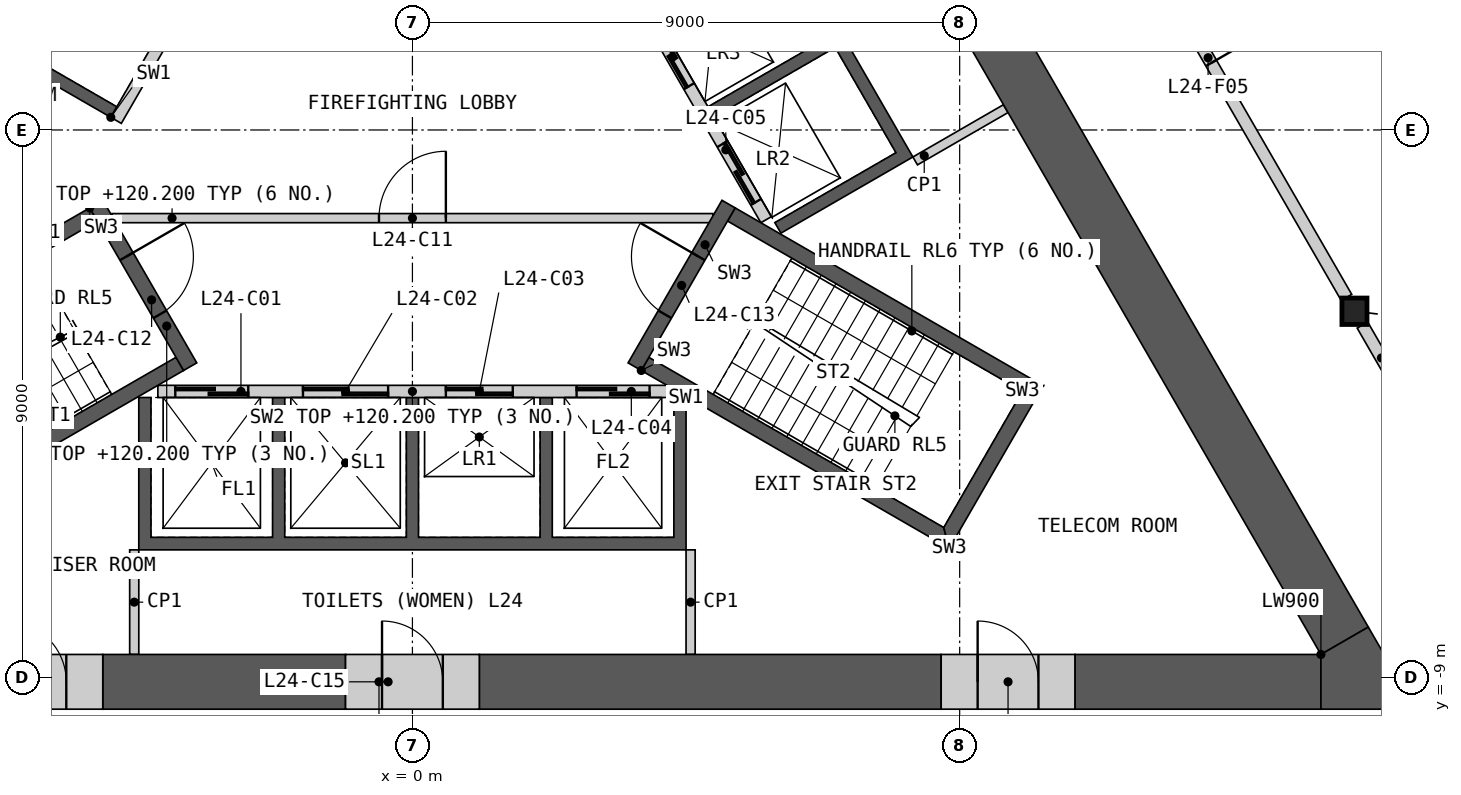
"""IFC4 building model, lengths in metres.
Left out: names, types, materials, properties, quantities, classifications, styles, units other than length and angle.
Written with IfcOpenShell. Run it as: python <this file> out.ifc"""

import sys

from ifc_helpers import new_model, si_unit, direction, frame, frame_2d, origin, origin_2d, place, context, subcontext, project, spatial, polyline, rectangle, i_section, outline, extrude, element, fill, save


model = new_model("IFC4")
c1 = context("Model", 3, precision=1e-05, world=origin(), true_north=direction((0.0, 1.0)))
c2 = subcontext(c1, "Body", "Model", "MODEL_VIEW")
j1 = project(units=[si_unit("LENGTHUNIT", "METRE"), si_unit("PLANEANGLEUNIT", "RADIAN")], contexts=[c1])
p1 = place(None, origin())
s1 = spatial("IfcSite", under=j1, at=p1, CompositionType="ELEMENT")
p2 = place(p1, origin())
s2 = spatial("IfcBuilding", under=s1, at=p2, CompositionType="ELEMENT")
p3 = place(p2, frame((0.0, 0.0, 116.4)))
s3 = spatial("IfcBuildingStorey", under=s2, at=p3, CompositionType="ELEMENT", Elevation=116.4)
p4 = place(p3, frame((15.493, -2.982, 0.0), z_axis=(0.0, 0.0, 1.0), x_axis=(1.0, 0.0, 0.0)))
e1 = element("IfcColumn", 1, at=p4, inside=s3, PredefinedType="COLUMN", context=c2, shape_type="SweptSolid", body=[
    extrude(i_section(OverallWidth=0.412, OverallDepth=0.435, WebThickness=0.036, FlangeThickness=0.057, at=origin_2d()), origin(), (0.0, 0.0, 1.0), 4.2),
])
p5 = place(p3, origin())
e2 = element("IfcWall", 2, at=p5, inside=s3, PredefinedType="SHEAR", context=c2, shape_type="SweptSolid", body=[
    extrude(outline(polyline([(4.5, -4.4), (4.5, -6.906), (-4.5, -6.906), (-4.5, -4.4), (-4.3, -4.4), (-4.3, -6.7), (-2.3, -6.7), (-2.3, -4.4), (-2.1, -4.4), (-2.1, -6.7), (-0.1, -6.7), (-0.1, -4.4), (0.1, -4.4), (0.1, -6.7), (2.1, -6.7), (2.1, -4.4), (2.3, -4.4), (2.3, -6.7), (4.3, -6.7), (4.3, -4.4), (4.5, -4.4)])), origin(), (0.0, 0.0, 1.0), 3.8),
])
p6 = place(p3, frame((-4.187, -4.3, 0.0), z_axis=(0.0, 0.0, 1.0), x_axis=(1.0, 0.0, 0.0)))
e3 = element("IfcWall", 3, at=p6, inside=s3, PredefinedType="SOLIDWALL", context=c2, shape_type="SweptSolid", body=[
    extrude(rectangle(XDim=8.373, YDim=0.2, at=frame_2d((4.187, 0.0))), origin(), (0.0, 0.0, 1.0), 3.8),
])
p7 = place(p6, frame((0.287, 0.0, 0.0)))
e4 = element("IfcOpeningElement", 4, at=p7, cuts=e3, PredefinedType="OPENING", context=c2, shape_type="SweptSolid", body=[
    extrude(rectangle(XDim=1.2, YDim=2.1, at=frame_2d((0.6, 1.05))), frame((0.0, 0.11, 0.0), z_axis=(0.0, -1.0, 0.0), x_axis=(1.0, 0.0, 0.0)), (0.0, 0.0, 1.0), 0.22),
])
p8 = place(p6, frame((2.387, 0.0, 0.0)))
e5 = element("IfcOpeningElement", 5, at=p8, cuts=e3, PredefinedType="OPENING", context=c2, shape_type="SweptSolid", body=[
    extrude(rectangle(XDim=1.4, YDim=2.1, at=frame_2d((0.7, 1.05))), frame((0.0, 0.11, 0.0), z_axis=(0.0, -1.0, 0.0), x_axis=(1.0, 0.0, 0.0)), (0.0, 0.0, 1.0), 0.22),
])
p9 = place(p6, frame((4.737, 0.0, 0.0)))
e6 = element("IfcOpeningElement", 6, at=p9, cuts=e3, PredefinedType="OPENING", context=c2, shape_type="SweptSolid", body=[
    extrude(rectangle(XDim=1.1, YDim=2.1, at=frame_2d((0.55, 1.05))), frame((0.0, 0.11, 0.0), z_axis=(0.0, -1.0, 0.0), x_axis=(1.0, 0.0, 0.0)), (0.0, 0.0, 1.0), 0.22),
])
p10 = place(p6, frame((6.887, 0.0, 0.0)))
e7 = element("IfcOpeningElement", 7, at=p10, cuts=e3, PredefinedType="OPENING", context=c2, shape_type="SweptSolid", body=[
    extrude(rectangle(XDim=1.2, YDim=2.1, at=frame_2d((0.6, 1.05))), frame((0.0, 0.11, 0.0), z_axis=(0.0, -1.0, 0.0), x_axis=(1.0, 0.0, 0.0)), (0.0, 0.0, 1.0), 0.22),
])
p11 = place(p3, origin())
e8 = element("IfcWall", 8, at=p11, inside=s3, PredefinedType="SHEAR", context=c2, shape_type="SweptSolid", body=[
    extrude(outline(polyline([(2.66, 4.192), (4.831, 5.445), (8.231, -0.444), (6.061, -1.697), (5.96, -1.524), (7.952, -0.374), (6.952, 1.358), (4.96, 0.208), (4.861, 0.381), (6.852, 1.531), (5.852, 3.263), (3.861, 2.113), (3.76, 2.287), (5.752, 3.437), (4.752, 5.169), (2.76, 4.019), (2.66, 4.192)])), origin(), (0.0, 0.0, 1.0), 3.8),
])
p12 = place(p3, frame((5.817, -1.476, 0.0), z_axis=(0.0, 0.0, 1.0), x_axis=(-0.500002616675, 0.866023893041, 0.0)))
e9 = element("IfcWall", 9, at=p12, inside=s3, PredefinedType="SOLIDWALL", context=c2, shape_type="SweptSolid", body=[
    extrude(rectangle(XDim=8.373, YDim=0.2, at=frame_2d((4.187, 0.0))), origin(), (0.0, 0.0, 1.0), 3.8),
])
p13 = place(p12, frame((0.337, 0.0, 0.0)))
e10 = element("IfcOpeningElement", 10, at=p13, cuts=e9, PredefinedType="OPENING", context=c2, shape_type="SweptSolid", body=[
    extrude(rectangle(XDim=1.1, YDim=2.1, at=frame_2d((0.55, 1.05))), frame((0.0, 0.11, 0.0), z_axis=(0.0, -1.0, 0.0), x_axis=(1.0, 0.0, 0.0)), (0.0, 0.0, 1.0), 0.22),
])
p14 = place(p12, frame((2.537, 0.0, 0.0)))
e11 = element("IfcOpeningElement", 11, at=p14, cuts=e9, PredefinedType="OPENING", context=c2, shape_type="SweptSolid", body=[
    extrude(rectangle(XDim=1.1, YDim=2.1, at=frame_2d((0.55, 1.05))), frame((0.0, 0.11, 0.0), z_axis=(0.0, -1.0, 0.0), x_axis=(1.0, 0.0, 0.0)), (0.0, 0.0, 1.0), 0.22),
])
p15 = place(p12, frame((4.737, 0.0, 0.0)))
e12 = element("IfcOpeningElement", 12, at=p15, cuts=e9, PredefinedType="OPENING", context=c2, shape_type="SweptSolid", body=[
    extrude(rectangle(XDim=1.1, YDim=2.1, at=frame_2d((0.55, 1.05))), frame((0.0, 0.11, 0.0), z_axis=(0.0, -1.0, 0.0), x_axis=(1.0, 0.0, 0.0)), (0.0, 0.0, 1.0), 0.22),
])
p16 = place(p12, frame((7.037, 0.0, 0.0)))
e13 = element("IfcOpeningElement", 13, at=p16, cuts=e9, PredefinedType="OPENING", context=c2, shape_type="SweptSolid", body=[
    extrude(rectangle(XDim=0.9, YDim=2.1, at=frame_2d((0.45, 1.05))), frame((0.0, 0.11, 0.0), z_axis=(0.0, -1.0, 0.0), x_axis=(1.0, 0.0, 0.0)), (0.0, 0.0, 1.0), 0.22),
])
p17 = place(p3, origin())
e14 = element("IfcWall", 14, at=p17, inside=s3, PredefinedType="SHEAR", context=c2, shape_type="SweptSolid", body=[
    extrude(outline(polyline([(-4.96, 0.208), (-7.131, 1.461), (-5.931, 3.54), (-3.76, 2.287), (-3.861, 2.113), (-5.852, 3.263), (-6.852, 1.531), (-4.861, 0.381), (-4.96, 0.208)])), origin(), (0.0, 0.0, 1.0), 3.8),
])
p18 = place(p3, frame((-1.631, 5.776, 0.0), z_axis=(0.0, 0.0, 1.0), x_axis=(-0.499992876559, -0.866029516466, 0.0)))
e15 = element("IfcWall", 15, at=p18, inside=s3, PredefinedType="SOLIDWALL", context=c2, shape_type="SweptSolid", body=[
    extrude(rectangle(XDim=6.486, YDim=0.2, at=frame_2d((3.243, 0.0))), origin(), (0.0, 0.0, 1.0), 3.8),
])
p19 = place(p18, frame((0.437, 0.0, 0.0)))
e16 = element("IfcOpeningElement", 16, at=p19, cuts=e15, PredefinedType="OPENING", context=c2, shape_type="SweptSolid", body=[
    extrude(rectangle(XDim=0.9, YDim=2.1, at=frame_2d((0.45, 1.05))), frame((0.0, 0.11, 0.0), z_axis=(0.0, -1.0, 0.0), x_axis=(1.0, 0.0, 0.0)), (0.0, 0.0, 1.0), 0.22),
])
p20 = place(p18, frame((2.637, 0.0, 0.0)))
e17 = element("IfcOpeningElement", 17, at=p20, cuts=e15, PredefinedType="OPENING", context=c2, shape_type="SweptSolid", body=[
    extrude(rectangle(XDim=0.9, YDim=2.1, at=frame_2d((0.45, 1.05))), frame((0.0, 0.11, 0.0), z_axis=(0.0, -1.0, 0.0), x_axis=(1.0, 0.0, 0.0)), (0.0, 0.0, 1.0), 0.22),
])
p21 = place(p3, frame((-4.941, -1.45, 0.0), z_axis=(0.0, 0.0, 1.0), x_axis=(1.0, 0.0, 0.0)))
e18 = element("IfcWall", 18, at=p21, inside=s3, PredefinedType="PARTITIONING", context=c2, shape_type="SweptSolid", body=[
    extrude(rectangle(XDim=9.882, YDim=0.15, at=frame_2d((4.941, 0.0))), origin(), (0.0, 0.0, 1.0), 3.8),
])
p22 = place(p21, frame((4.391, 0.0, 0.0)))
e19 = element("IfcOpeningElement", 19, at=p22, cuts=e18, PredefinedType="OPENING", context=c2, shape_type="SweptSolid", body=[
    extrude(rectangle(XDim=1.1, YDim=2.1, at=frame_2d((0.55, 1.05))), frame((0.0, 0.085, 0.0), z_axis=(0.0, -1.0, 0.0), x_axis=(1.0, 0.0, 0.0)), (0.0, 0.0, 1.0), 0.17),
])
p23 = place(p3, origin())
e20 = element("IfcWall", 20, at=p23, inside=s3, PredefinedType="SHEAR", context=c2, shape_type="SweptSolid", body=[
    extrude(outline(polyline([(-5.307, -1.281), (-10.374, -4.206), (-10.032, -4.298), (-5.182, -1.498), (-5.307, -1.281)])), origin(), (0.0, 0.0, 1.0), 3.8),
])
p24 = place(p3, origin())
e21 = element("IfcWall", 21, at=p24, inside=s3, PredefinedType="SHEAR", context=c2, shape_type="SweptSolid", body=[
    extrude(outline(polyline([(-8.738, -6.539), (-8.83, -6.881), (-3.763, -3.956), (-3.888, -3.739), (-8.738, -6.539)])), origin(), (0.0, 0.0, 1.0), 3.8),
])
p25 = place(p3, frame((-5.199, -1.219, 0.0), z_axis=(0.0, 0.0, 1.0), x_axis=(0.499982516597, -0.866035497597, 0.0)))
e22 = element("IfcWall", 22, at=p25, inside=s3, PredefinedType="SHEAR", context=c2, shape_type="SweptSolid", body=[
    extrude(rectangle(XDim=3.088, YDim=0.25, at=frame_2d((1.544, 0.0))), origin(), (0.0, 0.0, 1.0), 3.8),
])
p26 = place(p25, frame((0.994, 0.0, 0.0)))
e23 = element("IfcOpeningElement", 23, at=p26, cuts=e22, PredefinedType="OPENING", context=c2, shape_type="SweptSolid", body=[
    extrude(rectangle(XDim=1.1, YDim=2.1, at=frame_2d((0.55, 1.05))), frame((0.0, 0.135, 0.0), z_axis=(0.0, -1.0, 0.0), x_axis=(1.0, 0.0, 0.0)), (0.0, 0.0, 1.0), 0.27),
])
p27 = place(p3, origin())
e24 = element("IfcWall", 24, at=p27, inside=s3, PredefinedType="SHEAR", context=c2, shape_type="SweptSolid", body=[
    extrude(outline(polyline([(3.763, -3.956), (8.83, -6.881), (8.738, -6.539), (3.888, -3.739), (3.763, -3.956)])), origin(), (0.0, 0.0, 1.0), 3.8),
])
p28 = place(p3, origin())
e25 = element("IfcWall", 25, at=p28, inside=s3, PredefinedType="SHEAR", context=c2, shape_type="SweptSolid", body=[
    extrude(outline(polyline([(8.83, -6.881), (10.374, -4.206), (10.032, -4.298), (8.738, -6.539), (8.83, -6.881)])), origin(), (0.0, 0.0, 1.0), 3.8),
])
p29 = place(p3, origin())
e26 = element("IfcWall", 26, at=p29, inside=s3, PredefinedType="SHEAR", context=c2, shape_type="SweptSolid", body=[
    extrude(outline(polyline([(10.032, -4.298), (10.374, -4.206), (5.307, -1.281), (5.182, -1.498), (10.032, -4.298)])), origin(), (0.0, 0.0, 1.0), 3.8),
])
p30 = place(p3, frame((3.655, -3.893, 0.0), z_axis=(0.0, 0.0, 1.0), x_axis=(0.499982516597, 0.866035497597, 0.0)))
e27 = element("IfcWall", 27, at=p30, inside=s3, PredefinedType="SHEAR", context=c2, shape_type="SweptSolid", body=[
    extrude(rectangle(XDim=3.088, YDim=0.25, at=frame_2d((1.544, 0.0))), origin(), (0.0, 0.0, 1.0), 3.8),
])
p31 = place(p30, frame((0.994, 0.0, 0.0)))
e28 = element("IfcOpeningElement", 28, at=p31, cuts=e27, PredefinedType="OPENING", context=c2, shape_type="SweptSolid", body=[
    extrude(rectangle(XDim=1.1, YDim=2.1, at=frame_2d((0.55, 1.05))), frame((0.0, 0.135, 0.0), z_axis=(0.0, -1.0, 0.0), x_axis=(1.0, 0.0, 0.0)), (0.0, 0.0, 1.0), 0.27),
])
for number, where, z_axis, x_axis in (
    (29, (4.575, -6.906, 0.0), (0.0, 0.0, 1.0), (0.0, -1.0, 0.0)),
    (30, (-4.575, -6.906, 0.0), (0.0, 0.0, 1.0), (0.0, -1.0, 0.0)),
    (31, (8.268, -0.509, 0.0), (0.0, 0.0, 1.0), (0.866, 0.5, 0.0)),
):
    element("IfcWall", number, at=place(p3, frame(where, z_axis=z_axis, x_axis=x_axis)), inside=s3, PredefinedType="PARTITIONING", context=c2, shape_type="SweptSolid", body=[
        extrude(rectangle(XDim=1.72, YDim=0.15, at=frame_2d((0.86, 0.0))), origin(), (0.0, 0.0, 1.0), 3.8),
    ])
p32 = place(p3, frame((1.1, -9.076, 0.0), z_axis=(0.0, 0.0, 1.0), x_axis=(1.0, 0.0, 0.0)))
e32 = element("IfcWall", 32, at=p32, inside=s3, PredefinedType="SHEAR", context=c2, shape_type="SweptSolid", body=[
    extrude(rectangle(XDim=7.595, YDim=0.9, at=frame_2d((3.798, 0.0))), origin(), (0.0, 0.0, 1.0), 3.8),
])
p33 = place(p3, frame((10.896, -9.076, 0.0), z_axis=(0.0, 0.0, 1.0), x_axis=(1.0, 0.0, 0.0)))
e33 = element("IfcWall", 33, at=p33, inside=s3, PredefinedType="SHEAR", context=c2, shape_type="SweptSolid", body=[
    extrude(rectangle(XDim=4.046, YDim=0.9, at=frame_2d((2.023, 0.0))), origin(), (0.0, 0.0, 1.0), 3.8),
])
p34 = place(p3, frame((-5.093, -9.076, 0.0), z_axis=(0.0, 0.0, 1.0), x_axis=(1.0, 0.0, 0.0)))
e34 = element("IfcWall", 34, at=p34, inside=s3, PredefinedType="SHEAR", context=c2, shape_type="SweptSolid", body=[
    extrude(rectangle(XDim=3.992, YDim=0.9, at=frame_2d((1.996, 0.0))), origin(), (0.0, 0.0, 1.0), 3.8),
])
p35 = place(p3, frame((15.331, -8.401, 0.0), z_axis=(0.0, 0.0, 1.0), x_axis=(-0.49999216708, 0.866029926076, 0.0)))
e35 = element("IfcWall", 35, at=p35, inside=s3, PredefinedType="SHEAR", context=c2, shape_type="SweptSolid", body=[
    extrude(rectangle(XDim=12.641, YDim=0.9, at=frame_2d((6.321, 0.0))), origin(), (0.0, 0.0, 1.0), 3.8),
])
p36 = place(p3, origin())
e36 = element("IfcWall", 36, at=p36, inside=s3, PredefinedType="SHEAR", context=c2, shape_type="SweptSolid", body=[
    extrude(outline(polyline([(14.941, -8.626), (15.721, -8.176), (16.5, -9.526), (14.941, -9.526), (14.941, -8.626)])), origin(), (0.0, 0.0, 1.0), 3.8),
])
p37 = place(p3, frame((-1.1, -9.076, 0.0), z_axis=(0.0, 0.0, 1.0), x_axis=(1.0, 0.0, 0.0)))
e37 = element("IfcWall", 37, at=p37, inside=s3, PredefinedType="SHEAR", context=c2, shape_type="SweptSolid", body=[
    extrude(rectangle(XDim=2.2, YDim=0.9, at=frame_2d((1.1, 0.0))), origin(), (0.0, 0.0, 1.0), 3.8),
])
p38 = place(p37, frame((0.6, 0.0, 0.0)))
e38 = element("IfcOpeningElement", 38, at=p38, cuts=e37, PredefinedType="OPENING", context=c2, shape_type="SweptSolid", body=[
    extrude(rectangle(XDim=1.0, YDim=2.1, at=frame_2d((0.5, 1.05))), frame((0.0, 0.46, 0.0), z_axis=(0.0, -1.0, 0.0), x_axis=(1.0, 0.0, 0.0)), (0.0, 0.0, 1.0), 0.92),
])
p39 = place(p3, frame((8.696, -9.076, 0.0), z_axis=(0.0, 0.0, 1.0), x_axis=(1.0, 0.0, 0.0)))
e39 = element("IfcWall", 39, at=p39, inside=s3, PredefinedType="SHEAR", context=c2, shape_type="SweptSolid", body=[
    extrude(rectangle(XDim=2.2, YDim=0.9, at=frame_2d((1.1, 0.0))), origin(), (0.0, 0.0, 1.0), 3.8),
])
p40 = place(p39, frame((0.6, 0.0, 0.0)))
e40 = element("IfcOpeningElement", 40, at=p40, cuts=e39, PredefinedType="OPENING", context=c2, shape_type="SweptSolid", body=[
    extrude(rectangle(XDim=1.0, YDim=2.1, at=frame_2d((0.5, 1.05))), frame((0.0, 0.46, 0.0), z_axis=(0.0, -1.0, 0.0), x_axis=(1.0, 0.0, 0.0)), (0.0, 0.0, 1.0), 0.92),
])
p41 = place(p3, frame((-7.292, -9.076, 0.0), z_axis=(0.0, 0.0, 1.0), x_axis=(1.0, 0.0, 0.0)))
e41 = element("IfcWall", 41, at=p41, inside=s3, PredefinedType="SHEAR", context=c2, shape_type="SweptSolid", body=[
    extrude(rectangle(XDim=2.2, YDim=0.9, at=frame_2d((1.1, 0.0))), origin(), (0.0, 0.0, 1.0), 3.8),
])
p42 = place(p41, frame((0.6, 0.0, 0.0)))
e42 = element("IfcOpeningElement", 42, at=p42, cuts=e41, PredefinedType="OPENING", context=c2, shape_type="SweptSolid", body=[
    extrude(rectangle(XDim=1.0, YDim=2.1, at=frame_2d((0.5, 1.05))), frame((0.0, 0.46, 0.0), z_axis=(0.0, -1.0, 0.0), x_axis=(1.0, 0.0, 0.0)), (0.0, 0.0, 1.0), 0.92),
])
p43 = place(p3, frame((10.46, 5.736, 0.0), z_axis=(0.0, 0.0, 1.0), x_axis=(0.500004141693, -0.866023012564, 0.0)))
e43 = element("IfcWall", 43, at=p43, inside=s3, PredefinedType="PARTITIONING", context=c2, shape_type="SweptSolid", body=[
    extrude(rectangle(XDim=9.803, YDim=0.2, at=frame_2d((4.902, 0.0))), origin(), (0.0, 0.0, 1.0), 3.8),
])
p44 = place(p43, frame((4.352, 0.0, 0.0)))
e44 = element("IfcOpeningElement", 44, at=p44, cuts=e43, PredefinedType="OPENING", context=c2, shape_type="SweptSolid", body=[
    extrude(rectangle(XDim=1.0, YDim=2.1, at=frame_2d((0.5, 1.05))), frame((0.0, 0.11, 0.0), z_axis=(0.0, -1.0, 0.0), x_axis=(1.0, 0.0, 0.0)), (0.0, 0.0, 1.0), 0.22),
])
p45 = place(p3, frame((15.624, -3.209, 0.0), z_axis=(0.0, 0.0, 1.0), x_axis=(0.499997920671, -0.866026604282, 0.0)))
e45 = element("IfcWall", 45, at=p45, inside=s3, PredefinedType="PARTITIONING", context=c2, shape_type="SweptSolid", body=[
    extrude(rectangle(XDim=6.24, YDim=0.2, at=frame_2d((3.12, 0.0))), origin(), (0.0, 0.0, 1.0), 3.8),
])
p46 = place(p7, origin())
e46 = element("IfcDoor", 46, at=p46, inside=s3, OperationType="SLIDING_TO_LEFT", PredefinedType="DOOR", context=c2, shape_type="SweptSolid", body=[
    extrude(rectangle(XDim=1.2, YDim=2.1, at=frame_2d((0.6, 1.05))), frame((0.0, 0.025, 0.0), z_axis=(0.0, -1.0, 0.0), x_axis=(1.0, 0.0, 0.0)), (0.0, 0.0, 1.0), 0.05),
])
fill(e4, e46)
p47 = place(p8, origin())
e47 = element("IfcDoor", 47, at=p47, inside=s3, OperationType="SLIDING_TO_LEFT", PredefinedType="DOOR", context=c2, shape_type="SweptSolid", body=[
    extrude(rectangle(XDim=1.4, YDim=2.1, at=frame_2d((0.7, 1.05))), frame((0.0, 0.025, 0.0), z_axis=(0.0, -1.0, 0.0), x_axis=(1.0, 0.0, 0.0)), (0.0, 0.0, 1.0), 0.05),
])
fill(e5, e47)
p48 = place(p9, origin())
e48 = element("IfcDoor", 48, at=p48, inside=s3, OperationType="SLIDING_TO_LEFT", PredefinedType="DOOR", context=c2, shape_type="SweptSolid", body=[
    extrude(rectangle(XDim=1.1, YDim=2.1, at=frame_2d((0.55, 1.05))), frame((0.0, 0.025, 0.0), z_axis=(0.0, -1.0, 0.0), x_axis=(1.0, 0.0, 0.0)), (0.0, 0.0, 1.0), 0.05),
])
fill(e6, e48)
p49 = place(p10, origin())
e49 = element("IfcDoor", 49, at=p49, inside=s3, OperationType="SLIDING_TO_LEFT", PredefinedType="DOOR", context=c2, shape_type="SweptSolid", body=[
    extrude(rectangle(XDim=1.2, YDim=2.1, at=frame_2d((0.6, 1.05))), frame((0.0, 0.025, 0.0), z_axis=(0.0, -1.0, 0.0), x_axis=(1.0, 0.0, 0.0)), (0.0, 0.0, 1.0), 0.05),
])
fill(e7, e49)
p50 = place(p13, origin())
e50 = element("IfcDoor", 50, at=p50, inside=s3, OperationType="SLIDING_TO_LEFT", PredefinedType="DOOR", context=c2, shape_type="SweptSolid", body=[
    extrude(rectangle(XDim=1.1, YDim=2.1, at=frame_2d((0.55, 1.05))), frame((0.0, 0.025, 0.0), z_axis=(0.0, -1.0, 0.0), x_axis=(1.0, 0.0, 0.0)), (0.0, 0.0, 1.0), 0.05),
])
fill(e10, e50)
p51 = place(p14, origin())
e51 = element("IfcDoor", 51, at=p51, inside=s3, OperationType="SLIDING_TO_LEFT", PredefinedType="DOOR", context=c2, shape_type="SweptSolid", body=[
    extrude(rectangle(XDim=1.1, YDim=2.1, at=frame_2d((0.55, 1.05))), frame((0.0, 0.025, 0.0), z_axis=(0.0, -1.0, 0.0), x_axis=(1.0, 0.0, 0.0)), (0.0, 0.0, 1.0), 0.05),
])
fill(e11, e51)
p52 = place(p22, origin())
e52 = element("IfcDoor", 52, at=p52, inside=s3, OperationType="SINGLE_SWING_RIGHT", PredefinedType="DOOR", context=c2, shape_type="SweptSolid", body=[
    extrude(rectangle(XDim=1.1, YDim=2.1, at=frame_2d((0.55, 1.05))), frame((0.0, 0.025, 0.0), z_axis=(0.0, -1.0, 0.0), x_axis=(1.0, 0.0, 0.0)), (0.0, 0.0, 1.0), 0.05),
])
fill(e19, e52)
p53 = place(p26, origin())
e53 = element("IfcDoor", 53, at=p53, inside=s3, OperationType="SINGLE_SWING_LEFT", PredefinedType="DOOR", context=c2, shape_type="SweptSolid", body=[
    extrude(rectangle(XDim=1.1, YDim=2.1, at=frame_2d((0.55, 1.05))), frame((0.0, 0.025, 0.0), z_axis=(0.0, -1.0, 0.0), x_axis=(1.0, 0.0, 0.0)), (0.0, 0.0, 1.0), 0.05),
])
fill(e23, e53)
p54 = place(p31, origin())
e54 = element("IfcDoor", 54, at=p54, inside=s3, OperationType="SINGLE_SWING_RIGHT", PredefinedType="DOOR", context=c2, shape_type="SweptSolid", body=[
    extrude(rectangle(XDim=1.1, YDim=2.1, at=frame_2d((0.55, 1.05))), frame((0.0, 0.025, 0.0), z_axis=(0.0, -1.0, 0.0), x_axis=(1.0, 0.0, 0.0)), (0.0, 0.0, 1.0), 0.05),
])
fill(e28, e54)
p55 = place(p38, origin())
e55 = element("IfcDoor", 55, at=p55, inside=s3, OperationType="SINGLE_SWING_LEFT", PredefinedType="DOOR", context=c2, shape_type="SweptSolid", body=[
    extrude(rectangle(XDim=1.0, YDim=2.1, at=frame_2d((0.5, 1.05))), frame((0.0, 0.205, 0.0), z_axis=(0.0, -1.0, 0.0), x_axis=(1.0, 0.0, 0.0)), (0.0, 0.0, 1.0), 0.05),
])
fill(e38, e55)
p56 = place(p40, origin())
e56 = element("IfcDoor", 56, at=p56, inside=s3, OperationType="SINGLE_SWING_LEFT", PredefinedType="DOOR", context=c2, shape_type="SweptSolid", body=[
    extrude(rectangle(XDim=1.0, YDim=2.1, at=frame_2d((0.5, 1.05))), frame((0.0, 0.205, 0.0), z_axis=(0.0, -1.0, 0.0), x_axis=(1.0, 0.0, 0.0)), (0.0, 0.0, 1.0), 0.05),
])
fill(e40, e56)
p57 = place(p42, origin())
e57 = element("IfcDoor", 57, at=p57, inside=s3, OperationType="SINGLE_SWING_LEFT", PredefinedType="DOOR", context=c2, shape_type="SweptSolid", body=[
    extrude(rectangle(XDim=1.0, YDim=2.1, at=frame_2d((0.5, 1.05))), frame((0.0, 0.205, 0.0), z_axis=(0.0, -1.0, 0.0), x_axis=(1.0, 0.0, 0.0)), (0.0, 0.0, 1.0), 0.05),
])
fill(e42, e57)
p58 = place(p44, origin())
e58 = element("IfcDoor", 58, at=p58, inside=s3, OperationType="SINGLE_SWING_RIGHT", PredefinedType="DOOR", context=c2, shape_type="SweptSolid", body=[
    extrude(rectangle(XDim=1.0, YDim=2.1, at=frame_2d((0.5, 1.05))), frame((0.0, 0.025, 0.0), z_axis=(0.0, -1.0, 0.0), x_axis=(1.0, 0.0, 0.0)), (0.0, 0.0, 1.0), 0.05),
])
fill(e44, e58)
save(model, sys.argv[1])
